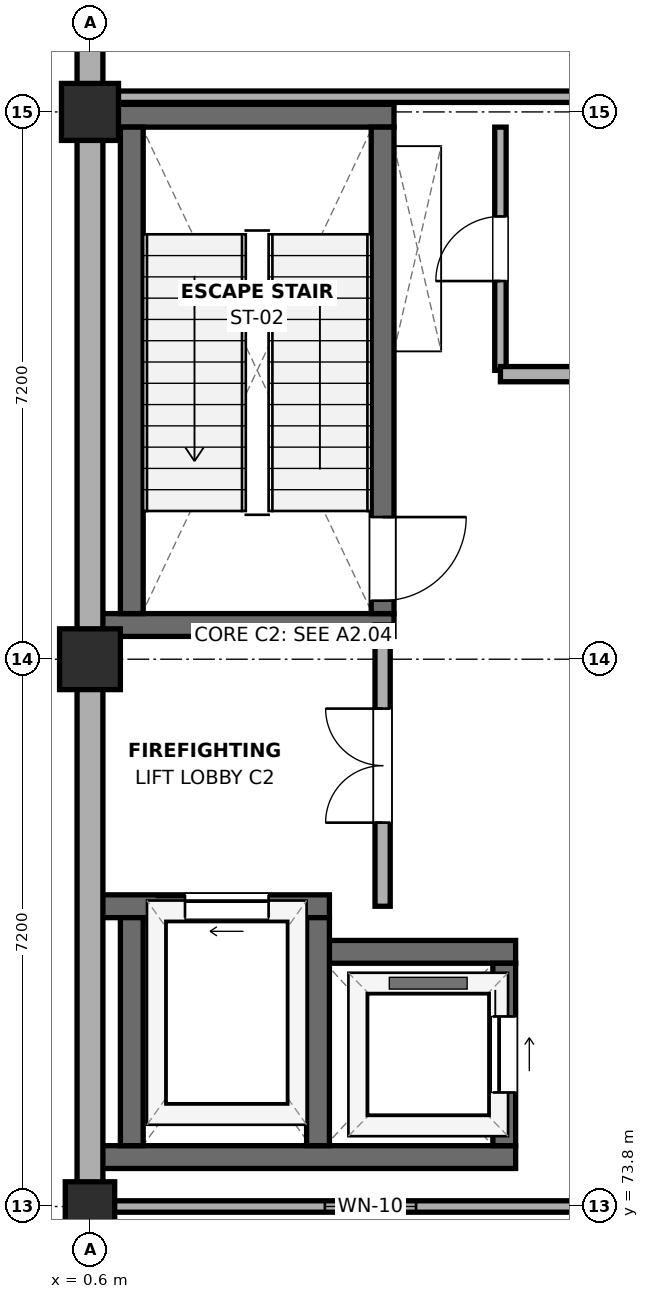
"""IFC4 building model, lengths in metres.
Left out: names, types, materials, properties, quantities, classifications, styles, units other than length and angle.
Written with IfcOpenShell. Run it as: python <this file> out.ifc"""

import sys

from ifc_helpers import new_model, si_unit, direction, frame, frame_2d, origin, origin_2d, place, context, subcontext, project, spatial, rectangle, extrude, element, fill, save


model = new_model("IFC4")
c1 = context("Model", 3, precision=1e-05, world=origin(), true_north=direction((0.0, 1.0)))
c2 = subcontext(c1, "Body", "Model", "MODEL_VIEW")
j1 = project(units=[si_unit("LENGTHUNIT", "METRE"), si_unit("PLANEANGLEUNIT", "RADIAN")], contexts=[c1])
p1 = place(None, origin())
s1 = spatial("IfcSite", under=j1, at=p1, CompositionType="ELEMENT")
p2 = place(p1, origin())
s2 = spatial("IfcBuilding", under=s1, at=p2, CompositionType="ELEMENT")
p3 = place(p2, origin())
s3 = spatial("IfcBuildingStorey", under=s2, at=p3, CompositionType="ELEMENT", Elevation=0.0)
p4 = place(p3, frame((0.6, 73.8, 0.0), z_axis=(0.0, 0.0, 1.0), x_axis=(1.0, 0.0, 0.0)))
e1 = element("IfcColumn", 1, at=p4, inside=s3, PredefinedType="COLUMN", context=c2, shape_type="SweptSolid", body=[
    extrude(rectangle(XDim=0.65, YDim=0.65, at=origin_2d()), origin(), (0.0, 0.0, 1.0), 4.8),
])
p5 = place(p3, frame((0.6, 81.0, 0.0), z_axis=(0.0, 0.0, 1.0), x_axis=(1.0, 0.0, 0.0)))
e2 = element("IfcColumn", 2, at=p5, inside=s3, PredefinedType="COLUMN", context=c2, shape_type="SweptSolid", body=[
    extrude(rectangle(XDim=0.8, YDim=0.8, at=origin_2d()), origin(), (0.0, 0.0, 1.0), 4.8),
])
p6 = place(p3, frame((0.6, 88.2, 0.0), z_axis=(0.0, 0.0, 1.0), x_axis=(1.0, 0.0, 0.0)))
e3 = element("IfcColumn", 3, at=p6, inside=s3, PredefinedType="COLUMN", context=c2, shape_type="SweptSolid", body=[
    extrude(rectangle(XDim=0.75, YDim=0.75, at=origin_2d()), origin(), (0.0, 0.0, 1.0), 4.8),
])
for number, where, z_axis, x_axis in (
    (4, (0.75, 81.45, 0.0), (0.0, 0.0, 1.0), (1.0, 0.0, 0.0)),
    (5, (0.75, 88.15, 0.0), (0.0, 0.0, 1.0), (1.0, 0.0, 0.0)),
):
    element("IfcWall", number, at=place(p3, frame(where, z_axis=z_axis, x_axis=x_axis)), inside=s3, PredefinedType="SHEAR", context=c2, shape_type="SweptSolid", body=[
        extrude(rectangle(XDim=3.85, YDim=0.3, at=frame_2d((1.925, 0.0))), origin(), (0.0, 0.0, 1.0), 4.56),
    ])
p7 = place(p3, frame((1.15, 81.6, 0.0), z_axis=(0.0, 0.0, 1.0), x_axis=(0.0, 1.0, 0.0)))
e6 = element("IfcWall", 6, at=p7, inside=s3, PredefinedType="SHEAR", context=c2, shape_type="SweptSolid", body=[
    extrude(rectangle(XDim=6.4, YDim=0.3, at=frame_2d((3.2, 0.0))), origin(), (0.0, 0.0, 1.0), 4.56),
])
p8 = place(p3, frame((4.45, 81.6, 0.0), z_axis=(0.0, 0.0, 1.0), x_axis=(0.0, 1.0, 0.0)))
e7 = element("IfcWall", 7, at=p8, inside=s3, PredefinedType="SHEAR", context=c2, shape_type="SweptSolid", body=[
    extrude(rectangle(XDim=6.4, YDim=0.3, at=frame_2d((3.2, 0.0))), origin(), (0.0, 0.0, 1.0), 4.56),
])
p9 = place(p8, frame((0.17, 0.0, 0.0)))
e8 = element("IfcOpeningElement", 8, at=p9, cuts=e7, PredefinedType="OPENING", context=c2, shape_type="SweptSolid", body=[
    extrude(rectangle(XDim=1.1, YDim=2.15, at=frame_2d((0.55, 1.075))), frame((0.0, 0.165, 0.0), z_axis=(0.0, -1.0, 0.0), x_axis=(1.0, 0.0, 0.0)), (0.0, 0.0, 1.0), 0.33),
])
p10 = place(p3, frame((0.75, 74.45, 0.0), z_axis=(0.0, 0.0, 1.0), x_axis=(1.0, 0.0, 0.0)))
e9 = element("IfcWall", 9, at=p10, inside=s3, PredefinedType="SHEAR", context=c2, shape_type="SweptSolid", body=[
    extrude(rectangle(XDim=5.45, YDim=0.3, at=frame_2d((2.725, 0.0))), origin(), (0.0, 0.0, 1.0), 4.56),
])
p11 = place(p3, frame((0.75, 77.75, 0.0), z_axis=(0.0, 0.0, 1.0), x_axis=(1.0, 0.0, 0.0)))
e10 = element("IfcWall", 10, at=p11, inside=s3, PredefinedType="SHEAR", context=c2, shape_type="SweptSolid", body=[
    extrude(rectangle(XDim=3.0, YDim=0.3, at=frame_2d((1.5, 0.0))), origin(), (0.0, 0.0, 1.0), 4.56),
])
p12 = place(p11, frame((1.1, 0.0, 0.0)))
e11 = element("IfcOpeningElement", 11, at=p12, cuts=e10, PredefinedType="OPENING", context=c2, shape_type="SweptSolid", body=[
    extrude(rectangle(XDim=1.1, YDim=2.15, at=frame_2d((0.55, 1.075))), frame((0.0, 0.165, 0.0), z_axis=(0.0, -1.0, 0.0), x_axis=(1.0, 0.0, 0.0)), (0.0, 0.0, 1.0), 0.33),
])
p13 = place(p3, frame((3.75, 77.15, 0.0), z_axis=(0.0, 0.0, 1.0), x_axis=(1.0, 0.0, 0.0)))
e12 = element("IfcWall", 12, at=p13, inside=s3, PredefinedType="SHEAR", context=c2, shape_type="SweptSolid", body=[
    extrude(rectangle(XDim=2.45, YDim=0.3, at=frame_2d((1.225, 0.0))), origin(), (0.0, 0.0, 1.0), 4.56),
])
for number, where, z_axis, x_axis in (
    (13, (1.15, 74.6, 0.0), (0.0, 0.0, 1.0), (0.0, 1.0, 0.0)),
    (14, (3.6, 74.6, 0.0), (0.0, 0.0, 1.0), (0.0, 1.0, 0.0)),
):
    element("IfcWall", number, at=place(p3, frame(where, z_axis=z_axis, x_axis=x_axis)), inside=s3, PredefinedType="SHEAR", context=c2, shape_type="SweptSolid", body=[
        extrude(rectangle(XDim=3.0, YDim=0.3, at=frame_2d((1.5, 0.0))), origin(), (0.0, 0.0, 1.0), 4.56),
    ])
p14 = place(p3, frame((6.05, 74.6, 0.0), z_axis=(0.0, 0.0, 1.0), x_axis=(0.0, 1.0, 0.0)))
e15 = element("IfcWall", 15, at=p14, inside=s3, PredefinedType="SHEAR", context=c2, shape_type="SweptSolid", body=[
    extrude(rectangle(XDim=2.4, YDim=0.3, at=frame_2d((1.2, 0.0))), origin(), (0.0, 0.0, 1.0), 4.56),
])
p15 = place(p14, frame((0.7, 0.0, 0.0)))
e16 = element("IfcOpeningElement", 16, at=p15, cuts=e15, PredefinedType="OPENING", context=c2, shape_type="SweptSolid", body=[
    extrude(rectangle(XDim=1.0, YDim=2.15, at=frame_2d((0.5, 1.075))), frame((0.0, 0.165, 0.0), z_axis=(0.0, -1.0, 0.0), x_axis=(1.0, 0.0, 0.0)), (0.0, 0.0, 1.0), 0.33),
])
p16 = place(p3, frame((0.6, 66.6, 0.0), z_axis=(0.0, 0.0, 1.0), x_axis=(0.0, 1.0, 0.0)))
e17 = element("IfcWall", 17, at=p16, inside=s3, PredefinedType="SOLIDWALL", context=c2, shape_type="SweptSolid", body=[
    extrude(rectangle(XDim=7.2, YDim=0.34, at=frame_2d((3.6, 0.0))), origin(), (0.0, 0.0, 1.0), 4.055),
])
p17 = place(p16, frame((2.6, 0.0, 0.9)))
e18 = element("IfcOpeningElement", 18, at=p17, cuts=e17, PredefinedType="OPENING", context=c2, shape_type="SweptSolid", body=[
    extrude(rectangle(XDim=2.0, YDim=1.8, at=frame_2d((1.0, 0.9))), frame((0.0, 0.185, 0.0), z_axis=(0.0, -1.0, 0.0), x_axis=(1.0, 0.0, 0.0)), (0.0, 0.0, 1.0), 0.37),
])
p18 = place(p3, frame((0.6, 73.8, 0.0), z_axis=(0.0, 0.0, 1.0), x_axis=(0.0, 1.0, 0.0)))
e19 = element("IfcWall", 19, at=p18, inside=s3, PredefinedType="SOLIDWALL", context=c2, shape_type="SweptSolid", body=[
    extrude(rectangle(XDim=7.2, YDim=0.34, at=frame_2d((3.6, 0.0))), origin(), (0.0, 0.0, 1.0), 4.105),
])
p19 = place(p3, frame((0.6, 81.0, 0.0), z_axis=(0.0, 0.0, 1.0), x_axis=(0.0, 1.0, 0.0)))
e20 = element("IfcWall", 20, at=p19, inside=s3, PredefinedType="SOLIDWALL", context=c2, shape_type="SweptSolid", body=[
    extrude(rectangle(XDim=7.2, YDim=0.34, at=frame_2d((3.6, 0.0))), origin(), (0.0, 0.0, 1.0), 4.205),
])
p20 = place(p3, frame((0.6, 88.2, 0.0), z_axis=(0.0, 0.0, 1.0), x_axis=(0.0, 1.0, 0.0)))
e21 = element("IfcWall", 21, at=p20, inside=s3, PredefinedType="SOLIDWALL", context=c2, shape_type="SweptSolid", body=[
    extrude(rectangle(XDim=7.8, YDim=0.34, at=frame_2d((3.9, 0.0))), origin(), (0.0, 0.0, 1.0), 4.225),
])
p21 = place(p3, frame((4.45, 77.75, 0.0), z_axis=(0.0, 0.0, 1.0), x_axis=(0.0, 1.0, 0.0)))
e22 = element("IfcWall", 22, at=p21, inside=s3, PredefinedType="PARTITIONING", context=c2, shape_type="SweptSolid", body=[
    extrude(rectangle(XDim=3.7, YDim=0.2, at=frame_2d((1.85, 0.0))), origin(), (0.0, 0.0, 1.0), 3.955),
])
p22 = place(p21, frame((1.1, 0.0, 0.0)))
e23 = element("IfcOpeningElement", 23, at=p22, cuts=e22, PredefinedType="OPENING", context=c2, shape_type="SweptSolid", body=[
    extrude(rectangle(XDim=1.5, YDim=2.15, at=frame_2d((0.75, 1.075))), frame((0.0, 0.115, 0.0), z_axis=(0.0, -1.0, 0.0), x_axis=(1.0, 0.0, 0.0)), (0.0, 0.0, 1.0), 0.23),
])
p23 = place(p3, frame((6.0, 84.8, 0.0), z_axis=(0.0, 0.0, 1.0), x_axis=(0.0, 1.0, 0.0)))
e24 = element("IfcWall", 24, at=p23, inside=s3, PredefinedType="PARTITIONING", context=c2, shape_type="SweptSolid", body=[
    extrude(rectangle(XDim=3.2, YDim=0.15, at=frame_2d((1.6, 0.0))), origin(), (0.0, 0.0, 1.0), 4.105),
])
p24 = place(p23, frame((1.175, 0.0, 0.0)))
e25 = element("IfcOpeningElement", 25, at=p24, cuts=e24, PredefinedType="OPENING", context=c2, shape_type="SweptSolid", body=[
    extrude(rectangle(XDim=0.85, YDim=2.1, at=frame_2d((0.425, 1.05))), frame((0.0, 0.09, 0.0), z_axis=(0.0, -1.0, 0.0), x_axis=(1.0, 0.0, 0.0)), (0.0, 0.0, 1.0), 0.18),
])
p25 = place(p3, frame((6.0, 84.75, 0.0), z_axis=(0.0, 0.0, 1.0), x_axis=(1.0, 0.0, 0.0)))
e26 = element("IfcWall", 26, at=p25, inside=s3, PredefinedType="PARTITIONING", context=c2, shape_type="SweptSolid", body=[
    extrude(rectangle(XDim=16.06, YDim=0.2, at=frame_2d((8.03, 0.0))), origin(), (0.0, 0.0, 1.0), 4.205),
])
p26 = place(p25, frame((2.45, 0.0, 0.0)))
e27 = element("IfcOpeningElement", 27, at=p26, cuts=e26, PredefinedType="OPENING", context=c2, shape_type="SweptSolid", body=[
    extrude(rectangle(XDim=1.1, YDim=2.15, at=frame_2d((0.55, 1.075))), frame((0.0, 0.115, 0.0), z_axis=(0.0, -1.0, 0.0), x_axis=(1.0, 0.0, 0.0)), (0.0, 0.0, 1.0), 0.23),
])
p27 = place(p3, frame((0.78, 73.8, 0.0), z_axis=(0.0, 0.0, 1.0), x_axis=(1.0, 0.0, 0.0)))
e28 = element("IfcWall", 28, at=p27, inside=s3, PredefinedType="PARTITIONING", context=c2, shape_type="SweptSolid", body=[
    extrude(rectangle(XDim=7.02, YDim=0.15, at=frame_2d((3.51, 0.0))), origin(), (0.0, 0.0, 1.0), 4.105),
])
p28 = place(p27, frame((2.91, 0.0, 0.95)))
e29 = element("IfcOpeningElement", 29, at=p28, cuts=e28, PredefinedType="OPENING", context=c2, shape_type="SweptSolid", body=[
    extrude(rectangle(XDim=1.2, YDim=1.5, at=frame_2d((0.6, 0.75))), frame((0.0, 0.09, 0.0), z_axis=(0.0, -1.0, 0.0), x_axis=(1.0, 0.0, 0.0)), (0.0, 0.0, 1.0), 0.18),
])
p29 = place(p3, frame((0.78, 88.4, 0.0), z_axis=(0.0, 0.0, 1.0), x_axis=(1.0, 0.0, 0.0)))
e30 = element("IfcWall", 30, at=p29, inside=s3, PredefinedType="PARTITIONING", context=c2, shape_type="SweptSolid", body=[
    extrude(rectangle(XDim=7.02, YDim=0.15, at=frame_2d((3.51, 0.0))), origin(), (0.0, 0.0, 1.0), 4.105),
])
p30 = place(p9, frame((1.1, 0.0, 0.0), z_axis=(0.0, 0.0, 1.0), x_axis=(-1.0, 0.0, 0.0)))
e31 = element("IfcDoor", 31, at=p30, inside=s3, OperationType="SINGLE_SWING_LEFT", PredefinedType="DOOR", context=c2, shape_type="SweptSolid", body=[
    extrude(rectangle(XDim=1.1, YDim=2.15, at=frame_2d((0.55, 1.075))), frame((0.0, 0.025, 0.0), z_axis=(0.0, -1.0, 0.0), x_axis=(1.0, 0.0, 0.0)), (0.0, 0.0, 1.0), 0.05),
])
fill(e8, e31)
p31 = place(p12, origin())
e32 = element("IfcDoor", 32, at=p31, inside=s3, OperationType="SLIDING_TO_LEFT", PredefinedType="DOOR", context=c2, shape_type="SweptSolid", body=[
    extrude(rectangle(XDim=1.1, YDim=2.15, at=frame_2d((0.55, 1.075))), frame((0.0, 0.025, 0.0), z_axis=(0.0, -1.0, 0.0), x_axis=(1.0, 0.0, 0.0)), (0.0, 0.0, 1.0), 0.05),
])
fill(e11, e32)
p32 = place(p15, frame((1.0, 0.0, 0.0), z_axis=(0.0, 0.0, 1.0), x_axis=(-1.0, 0.0, 0.0)))
e33 = element("IfcDoor", 33, at=p32, inside=s3, OperationType="SLIDING_TO_RIGHT", PredefinedType="DOOR", context=c2, shape_type="SweptSolid", body=[
    extrude(rectangle(XDim=1.0, YDim=2.15, at=frame_2d((0.5, 1.075))), frame((0.0, 0.025, 0.0), z_axis=(0.0, -1.0, 0.0), x_axis=(1.0, 0.0, 0.0)), (0.0, 0.0, 1.0), 0.05),
])
fill(e16, e33)
p33 = place(p22, origin())
e34 = element("IfcDoor", 34, at=p33, inside=s3, OperationType="DOUBLE_DOOR_SINGLE_SWING", PredefinedType="DOOR", context=c2, shape_type="SweptSolid", body=[
    extrude(rectangle(XDim=1.5, YDim=2.15, at=frame_2d((0.75, 1.075))), frame((0.0, 0.025, 0.0), z_axis=(0.0, -1.0, 0.0), x_axis=(1.0, 0.0, 0.0)), (0.0, 0.0, 1.0), 0.05),
])
fill(e23, e34)
p34 = place(p24, origin())
e35 = element("IfcDoor", 35, at=p34, inside=s3, OperationType="SINGLE_SWING_LEFT", PredefinedType="DOOR", context=c2, shape_type="SweptSolid", body=[
    extrude(rectangle(XDim=0.85, YDim=2.1, at=frame_2d((0.425, 1.05))), frame((0.0, 0.025, 0.0), z_axis=(0.0, -1.0, 0.0), x_axis=(1.0, 0.0, 0.0)), (0.0, 0.0, 1.0), 0.05),
])
fill(e25, e35)
p35 = place(p28, origin())
e36 = element("IfcWindow", 36, at=p35, inside=s3, PartitioningType="SINGLE_PANEL", PredefinedType="WINDOW", context=c2, shape_type="SweptSolid", body=[
    extrude(rectangle(XDim=1.2, YDim=1.5, at=frame_2d((0.6, 0.75))), frame((0.0, 0.03, 0.0), z_axis=(0.0, -1.0, 0.0), x_axis=(1.0, 0.0, 0.0)), (0.0, 0.0, 1.0), 0.06),
])
fill(e29, e36)
save(model, sys.argv[1])
